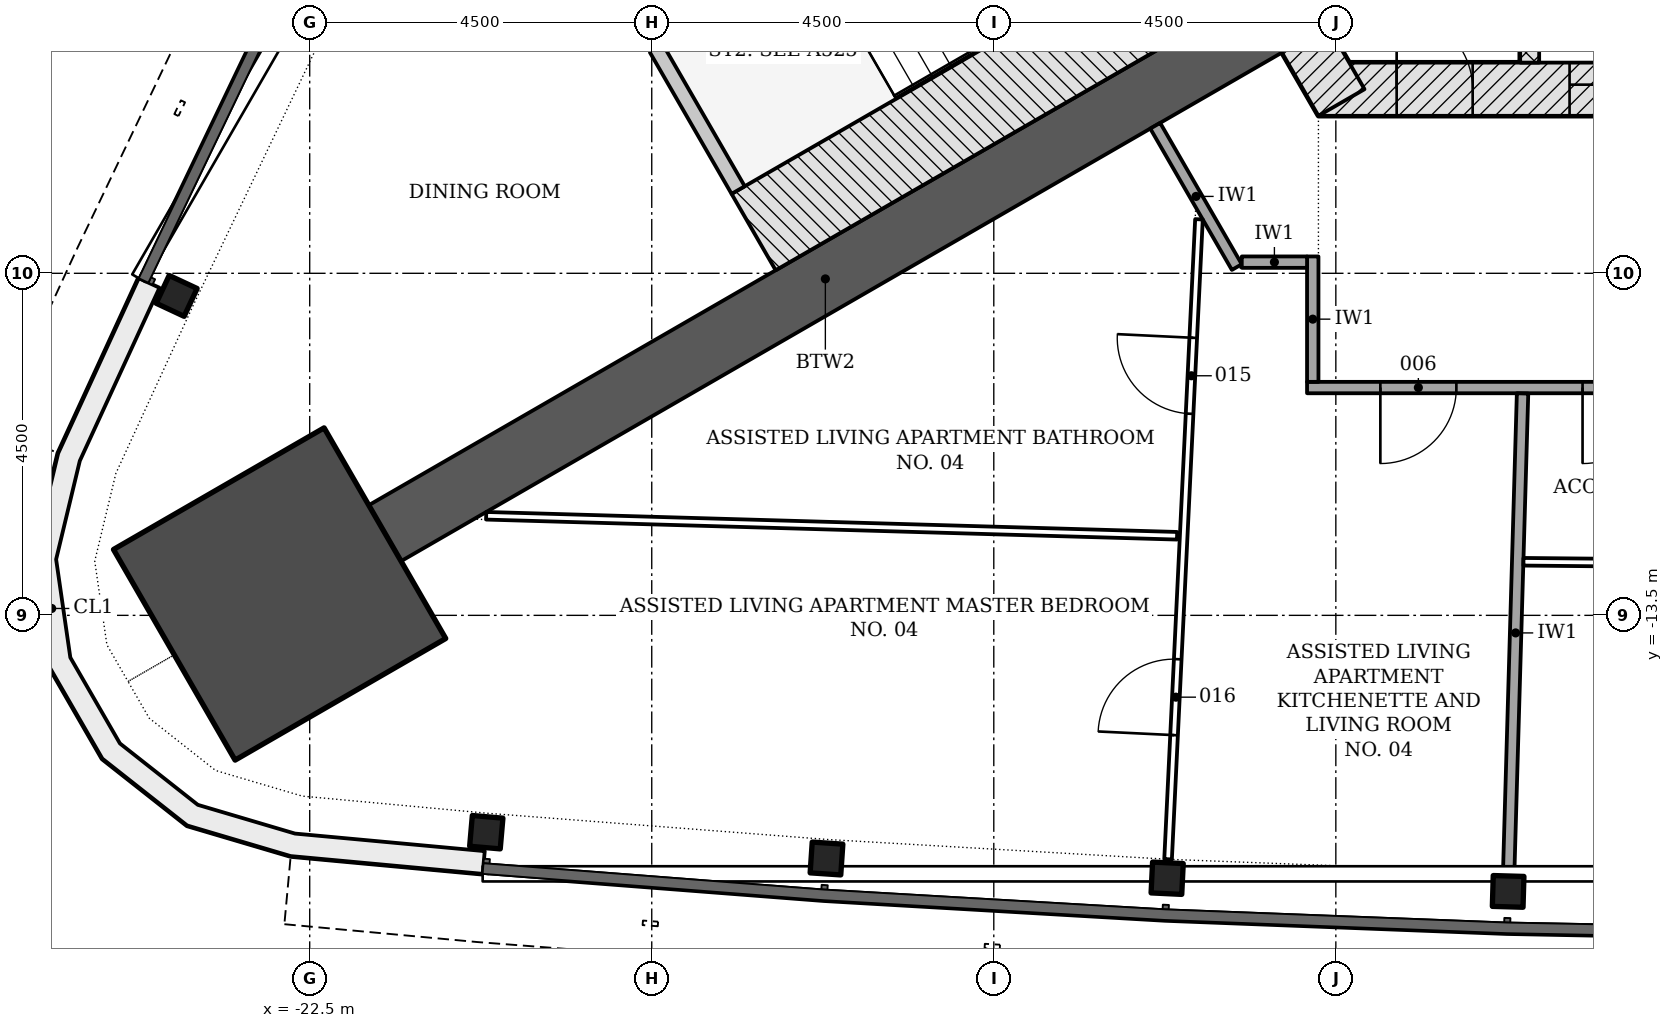
"""IFC4 building model, lengths in metres.
Left out: names, types, materials, properties, quantities, classifications, styles, units other than length and angle.
Written with IfcOpenShell. Run it as: python <this file> out.ifc"""

import sys

from ifc_helpers import new_model, si_unit, direction, frame, frame_2d, origin, origin_2d, place, context, subcontext, project, spatial, polyline, rectangle, i_section, outline, extrude, element, fill, save


model = new_model("IFC4")
c1 = context("Model", 3, precision=1e-05, world=origin(), true_north=direction((0.0, 1.0)))
c2 = subcontext(c1, "Body", "Model", "MODEL_VIEW")
j1 = project(units=[si_unit("LENGTHUNIT", "METRE"), si_unit("PLANEANGLEUNIT", "RADIAN")], contexts=[c1])
p1 = place(None, origin())
s1 = spatial("IfcSite", under=j1, at=p1, CompositionType="ELEMENT")
p2 = place(p1, origin())
s2 = spatial("IfcBuilding", under=s1, at=p2, CompositionType="ELEMENT")
p3 = place(p2, frame((0.0, 0.0, 72.6)))
s3 = spatial("IfcBuildingStorey", under=s2, at=p3, CompositionType="ELEMENT", Elevation=72.6)
p4 = place(p3, frame((-9.229, -6.578, -0.2), z_axis=(0.0, 0.0, 1.0), x_axis=(1.0, 0.0, 0.0)))
e1 = element("IfcWall", 1, at=p4, inside=s3, PredefinedType="SHEAR", context=c2, shape_type="SweptSolid", body=[
    extrude(rectangle(XDim=18.458, YDim=0.7, at=frame_2d((9.229, 0.0))), origin(), (0.0, 0.0, 1.0), 3.6),
])
p5 = place(p4, frame((3.304, 0.0, 0.2)))
e2 = element("IfcOpeningElement", 2, at=p5, cuts=e1, PredefinedType="OPENING", context=c2, shape_type="SweptSolid", body=[
    extrude(rectangle(XDim=1.1, YDim=2.1, at=frame_2d((0.55, 1.05))), frame((0.0, 0.36, 0.0), z_axis=(0.0, -1.0, 0.0), x_axis=(1.0, 0.0, 0.0)), (0.0, 0.0, 1.0), 0.72),
])
p6 = place(p4, frame((5.454, 0.0, 0.2)))
e3 = element("IfcOpeningElement", 3, at=p6, cuts=e1, PredefinedType="OPENING", context=c2, shape_type="SweptSolid", body=[
    extrude(rectangle(XDim=1.1, YDim=2.1, at=frame_2d((0.55, 1.05))), frame((0.0, 0.36, 0.0), z_axis=(0.0, -1.0, 0.0), x_axis=(1.0, 0.0, 0.0)), (0.0, 0.0, 1.0), 0.72),
])
p7 = place(p4, frame((7.604, 0.0, 0.2)))
e4 = element("IfcOpeningElement", 4, at=p7, cuts=e1, PredefinedType="OPENING", context=c2, shape_type="SweptSolid", body=[
    extrude(rectangle(XDim=1.1, YDim=2.1, at=frame_2d((0.55, 1.05))), frame((0.0, 0.36, 0.0), z_axis=(0.0, -1.0, 0.0), x_axis=(1.0, 0.0, 0.0)), (0.0, 0.0, 1.0), 0.72),
])
p8 = place(p4, frame((9.754, 0.0, 0.2)))
e5 = element("IfcOpeningElement", 5, at=p8, cuts=e1, PredefinedType="OPENING", context=c2, shape_type="SweptSolid", body=[
    extrude(rectangle(XDim=1.1, YDim=2.1, at=frame_2d((0.55, 1.05))), frame((0.0, 0.36, 0.0), z_axis=(0.0, -1.0, 0.0), x_axis=(1.0, 0.0, 0.0)), (0.0, 0.0, 1.0), 0.72),
])
p9 = place(p4, frame((11.904, 0.0, 0.2)))
e6 = element("IfcOpeningElement", 6, at=p9, cuts=e1, PredefinedType="OPENING", context=c2, shape_type="SweptSolid", body=[
    extrude(rectangle(XDim=1.1, YDim=2.1, at=frame_2d((0.55, 1.05))), frame((0.0, 0.36, 0.0), z_axis=(0.0, -1.0, 0.0), x_axis=(1.0, 0.0, 0.0)), (0.0, 0.0, 1.0), 0.72),
])
p10 = place(p4, frame((14.054, 0.0, 0.2)))
e7 = element("IfcOpeningElement", 7, at=p10, cuts=e1, PredefinedType="OPENING", context=c2, shape_type="SweptSolid", body=[
    extrude(rectangle(XDim=1.1, YDim=2.1, at=frame_2d((0.55, 1.05))), frame((0.0, 0.36, 0.0), z_axis=(0.0, -1.0, 0.0), x_axis=(1.0, 0.0, 0.0)), (0.0, 0.0, 1.0), 0.72),
])
p11 = place(p4, frame((1.029, 0.0, 0.2)))
e8 = element("IfcOpeningElement", 8, at=p11, cuts=e1, PredefinedType="OPENING", context=c2, shape_type="SweptSolid", body=[
    extrude(rectangle(XDim=1.0, YDim=2.1, at=frame_2d((0.5, 1.05))), frame((0.0, 0.36, 0.0), z_axis=(0.0, -1.0, 0.0), x_axis=(1.0, 0.0, 0.0)), (0.0, 0.0, 1.0), 0.72),
])
p12 = place(p3, frame((-10.311, -4.353, -0.2), z_axis=(0.0, 0.0, 1.0), x_axis=(0.500042739161, -0.866000726912, 0.0)))
e9 = element("IfcWall", 9, at=p12, inside=s3, PredefinedType="SHEAR", context=c2, shape_type="SweptSolid", body=[
    extrude(rectangle(XDim=2.771, YDim=0.7, at=frame_2d((1.386, 0.0))), origin(), (0.0, 0.0, 1.0), 3.6),
])
p13 = place(p3, frame((-9.922, -5.728, -0.2), z_axis=(0.0, 0.0, 1.0), x_axis=(-0.866026077102, -0.499998833779, 0.0)))
e10 = element("IfcWall", 10, at=p13, inside=s3, PredefinedType="SHEAR", context=c2, shape_type="SweptSolid", body=[
    extrude(rectangle(XDim=13.381, YDim=0.85, at=frame_2d((6.691, 0.0))), origin(), (0.0, 0.0, 1.0), 3.6),
])
p14 = place(p3, frame((-22.896, -13.219, -0.2), z_axis=(0.0, 0.0, 1.0), x_axis=(-0.866025403784, -0.5, 0.0)))
e11 = element("IfcColumn", 11, at=p14, inside=s3, PredefinedType="COLUMN", context=c2, shape_type="SweptSolid", body=[
    extrude(rectangle(XDim=3.2, YDim=3.2, at=origin_2d()), origin(), (0.0, 0.0, 1.0), 3.6),
])
for number, where, z_axis, x_axis in (
    (12, (-24.25, -9.297, -0.2), (0.0, 0.0, 1.0), (-0.423, -0.906, 0.0)),
    (13, (-20.177, -16.353, -0.2), (0.0, 0.0, 1.0), (0.996, -0.087, 0.0)),
    (14, (-15.701, -16.699, -0.2), (0.0, 0.0, 1.0), (0.998, -0.067, 0.0)),
    (15, (-11.219, -16.958, -0.2), (0.0, 0.0, 1.0), (0.999, -0.048, 0.0)),
    (16, (-6.733, -17.132, -0.2), (0.0, 0.0, 1.0), (1.0, -0.029, 0.0)),
):
    element("IfcColumn", number, at=place(p3, frame(where, z_axis=z_axis, x_axis=x_axis)), inside=s3, PredefinedType="COLUMN", context=c2, shape_type="SweptSolid", body=[
        extrude(i_section(OverallWidth=0.404, OverallDepth=0.406, WebThickness=0.027, FlangeThickness=0.044, FilletRadius=0.015, at=origin_2d()), origin(), (0.0, 0.0, 1.0), 3.6),
    ])
p15 = place(p3, origin())
e17 = element("IfcWall", 17, at=p15, inside=s3, PredefinedType="NOTDEFINED", context=c2, shape_type="SweptSolid", body=[
    extrude(outline(polyline([(-24.749, -9.065), (-25.809, -11.369), (-26.141, -12.75), (-25.938, -14.155), (-25.228, -15.385), (-24.112, -16.264), (-22.75, -16.667), (-20.225, -16.901), (-20.197, -16.602), (-22.693, -16.371), (-23.972, -15.993), (-24.997, -15.185), (-25.649, -14.055), (-25.836, -12.764), (-25.524, -11.468), (-24.476, -9.19), (-24.749, -9.065)])), origin(), (0.0, 0.0, 1.0), 3.3),
])
p16 = place(p3, frame((-6.45, -6.228, -0.2), z_axis=(0.0, 0.0, 1.0), x_axis=(0.0, 1.0, 0.0)))
e18 = element("IfcWall", 18, at=p16, inside=s3, PredefinedType="PARTITIONING", context=c2, shape_type="SweptSolid", body=[
    extrude(rectangle(XDim=2.5, YDim=0.25, at=frame_2d((1.25, 0.0))), origin(), (0.0, 0.0, 1.0), 3.6),
])
p17 = place(p3, frame((-10.424, -4.858, -0.2), z_axis=(0.0, 0.0, 1.0), x_axis=(-0.866033125095, -0.499986626058, 0.0)))
e19 = element("IfcWall", 19, at=p17, inside=s3, PredefinedType="SHEAR", context=c2, shape_type="SweptSolid", body=[
    extrude(rectangle(XDim=7.2, YDim=1.161, at=frame_2d((3.6, 0.0))), origin(), (0.0, 0.0, 1.0), 3.6),
])
p18 = place(p3, frame((0.0, 0.0, -0.2)))
e20 = element("IfcWall", 20, at=p18, inside=s3, PredefinedType="SHEAR", context=c2, shape_type="SweptSolid", body=[
    extrude(outline(polyline([(-17.439, -3.907), (-18.025, -6.093), (-16.95, -7.955), (-16.777, -7.855), (-17.81, -6.065), (-17.267, -4.039), (-17.339, -4.081), (-17.339, -4.081), (-17.339, -4.081), (-17.339, -4.081), (-17.339, -4.081), (-17.339, -4.081), (-17.339, -4.081), (-17.339, -4.081), (-17.339, -4.081), (-17.339, -4.081), (-17.339, -4.081), (-17.339, -4.081), (-17.339, -4.081), (-17.339, -4.081), (-17.339, -4.081), (-17.339, -4.081), (-17.339, -4.081), (-17.439, -3.907)])), origin(), (0.0, 0.0, 1.0), 3.6),
])
p19 = place(p3, frame((3.689, -10.503, 0.0), z_axis=(0.0, 0.0, 1.0), x_axis=(-1.0, 0.0, 0.0)))
e21 = element("IfcWall", 21, at=p19, inside=s3, PredefinedType="PARTITIONING", context=c2, shape_type="SweptSolid", body=[
    extrude(rectangle(XDim=13.068, YDim=0.15, at=frame_2d((6.534, 0.0))), origin(), (0.0, 0.0, 1.0), 2.778),
])
p20 = place(p19, frame((11.103, 0.0, 0.0)))
e22 = element("IfcOpeningElement", 22, at=p20, cuts=e21, PredefinedType="OPENING", context=c2, shape_type="SweptSolid", body=[
    extrude(rectangle(XDim=1.0, YDim=2.1, at=frame_2d((0.5, 1.05))), frame((0.0, 0.085, 0.0), z_axis=(0.0, -1.0, 0.0), x_axis=(1.0, 0.0, 0.0)), (0.0, 0.0, 1.0), 0.17),
])
p21 = place(p19, frame((8.443, 0.0, 0.0)))
e23 = element("IfcOpeningElement", 23, at=p21, cuts=e21, PredefinedType="OPENING", context=c2, shape_type="SweptSolid", body=[
    extrude(rectangle(XDim=1.0, YDim=2.1, at=frame_2d((0.5, 1.05))), frame((0.0, 0.085, 0.0), z_axis=(0.0, -1.0, 0.0), x_axis=(1.0, 0.0, 0.0)), (0.0, 0.0, 1.0), 0.17),
])
p22 = place(p19, frame((5.879, 0.0, 0.0)))
e24 = element("IfcOpeningElement", 24, at=p22, cuts=e21, PredefinedType="OPENING", context=c2, shape_type="SweptSolid", body=[
    extrude(rectangle(XDim=1.0, YDim=2.1, at=frame_2d((0.5, 1.05))), frame((0.0, 0.085, 0.0), z_axis=(0.0, -1.0, 0.0), x_axis=(1.0, 0.0, 0.0)), (0.0, 0.0, 1.0), 0.17),
])
p23 = place(p19, frame((2.556, 0.0, 0.0)))
e25 = element("IfcOpeningElement", 25, at=p23, cuts=e21, PredefinedType="OPENING", context=c2, shape_type="SweptSolid", body=[
    extrude(rectangle(XDim=1.5, YDim=2.1, at=frame_2d((0.75, 1.05))), frame((0.0, 0.085, 0.0), z_axis=(0.0, -1.0, 0.0), x_axis=(1.0, 0.0, 0.0)), (0.0, 0.0, 1.0), 0.17),
])
p24 = place(p3, frame((-11.376, -7.059, 0.0), z_axis=(0.0, 0.0, 1.0), x_axis=(0.500076779081, -0.865981070823, 0.0)))
e26 = element("IfcWall", 26, at=p24, inside=s3, PredefinedType="PARTITIONING", context=c2, shape_type="SweptSolid", body=[
    extrude(rectangle(XDim=2.147, YDim=0.15, at=frame_2d((1.074, 0.0))), origin(), (0.0, 0.0, 1.0), 2.778),
])
p25 = place(p3, frame((-9.304, -10.428, 0.0), z_axis=(0.0, 0.0, 1.0), x_axis=(0.0, 1.0, 0.0)))
e27 = element("IfcWall", 27, at=p25, inside=s3, PredefinedType="PARTITIONING", context=c2, shape_type="SweptSolid", body=[
    extrude(rectangle(XDim=1.65, YDim=0.15, at=frame_2d((0.825, 0.0))), origin(), (0.0, 0.0, 1.0), 3.4),
])
p26 = place(p3, frame((-10.238, -8.853, 0.0), z_axis=(0.0, 0.0, 1.0), x_axis=(1.0, 0.0, 0.0)))
e28 = element("IfcWall", 28, at=p26, inside=s3, PredefinedType="PARTITIONING", context=c2, shape_type="SweptSolid", body=[
    extrude(rectangle(XDim=0.859, YDim=0.15, at=frame_2d((0.43, 0.0))), origin(), (0.0, 0.0, 1.0), 3.4),
])
p27 = place(p3, frame((-6.726, -16.882, 0.0), z_axis=(0.0, 0.0, 1.0), x_axis=(0.028929036321, 0.999581467844, 0.0)))
e29 = element("IfcWall", 29, at=p27, inside=s3, PredefinedType="PARTITIONING", context=c2, shape_type="SweptSolid", body=[
    extrude(rectangle(XDim=6.304, YDim=0.15, at=frame_2d((3.152, 0.0))), origin(), (0.0, 0.0, 1.0), 2.778),
])
p28 = place(p3, frame((-11.089, -12.453, 0.0), z_axis=(0.0, 0.0, 1.0), x_axis=(-0.999581884532, 0.028914634982, 0.0)))
e30 = element("IfcWall", 30, at=p28, inside=s3, PredefinedType="PARTITIONING", context=c2, shape_type="SweptSolid", body=[
    extrude(rectangle(XDim=9.094, YDim=0.1, at=frame_2d((4.547, 0.0))), origin(), (0.0, 0.0, 1.0), 2.778),
])
p29 = place(p3, frame((-11.207, -16.709, 0.0), z_axis=(0.0, 0.0, 1.0), x_axis=(0.048196786961, 0.998837859578, 0.0)))
e31 = element("IfcWall", 31, at=p29, inside=s3, PredefinedType="PARTITIONING", context=c2, shape_type="SweptSolid", body=[
    extrude(rectangle(XDim=8.429, YDim=0.1, at=frame_2d((4.214, 0.0))), origin(), (0.0, 0.0, 1.0), 2.778),
])
p30 = place(p29, frame((5.868, 0.0, 0.0)))
e32 = element("IfcOpeningElement", 32, at=p30, cuts=e31, PredefinedType="OPENING", context=c2, shape_type="SweptSolid", body=[
    extrude(rectangle(XDim=1.0, YDim=2.1, at=frame_2d((0.5, 1.05))), frame((0.0, 0.06, 0.0), z_axis=(0.0, -1.0, 0.0), x_axis=(1.0, 0.0, 0.0)), (0.0, 0.0, 1.0), 0.12),
])
p31 = place(p29, frame((1.635, 0.0, 0.0)))
e33 = element("IfcOpeningElement", 33, at=p31, cuts=e31, PredefinedType="OPENING", context=c2, shape_type="SweptSolid", body=[
    extrude(rectangle(XDim=1.0, YDim=2.1, at=frame_2d((0.5, 1.05))), frame((0.0, 0.06, 0.0), z_axis=(0.0, -1.0, 0.0), x_axis=(1.0, 0.0, 0.0)), (0.0, 0.0, 1.0), 0.12),
])
p32 = place(p3, frame((-6.531, -12.795, 0.0), z_axis=(0.0, 0.0, 1.0), x_axis=(0.99995315176, -0.009679580841, 0.0)))
e34 = element("IfcWall", 34, at=p32, inside=s3, PredefinedType="PARTITIONING", context=c2, shape_type="SweptSolid", body=[
    extrude(rectangle(XDim=5.12, YDim=0.1, at=frame_2d((2.56, 0.0))), origin(), (0.0, 0.0, 1.0), 2.778),
])
p33 = place(p5, origin())
e35 = element("IfcDoor", 35, at=p33, inside=s3, OperationType="DOUBLE_DOOR_SLIDING", PredefinedType="DOOR", context=c2, shape_type="SweptSolid", body=[
    extrude(rectangle(XDim=1.1, YDim=2.1, at=frame_2d((0.55, 1.05))), frame((0.0, 0.025, 0.0), z_axis=(0.0, -1.0, 0.0), x_axis=(1.0, 0.0, 0.0)), (0.0, 0.0, 1.0), 0.05),
])
fill(e2, e35)
p34 = place(p11, origin())
e36 = element("IfcDoor", 36, at=p34, inside=s3, OperationType="SINGLE_SWING_LEFT", PredefinedType="DOOR", context=c2, shape_type="SweptSolid", body=[
    extrude(rectangle(XDim=1.0, YDim=2.1, at=frame_2d((0.5, 1.05))), frame((0.0, 0.075, 0.0), z_axis=(0.0, -1.0, 0.0), x_axis=(1.0, 0.0, 0.0)), (0.0, 0.0, 1.0), 0.15),
])
fill(e8, e36)
p35 = place(p20, origin())
e37 = element("IfcDoor", 37, at=p35, inside=s3, OperationType="SINGLE_SWING_RIGHT", PredefinedType="DOOR", context=c2, shape_type="SweptSolid", body=[
    extrude(rectangle(XDim=1.0, YDim=2.1, at=frame_2d((0.5, 1.05))), frame((0.0, 0.025, 0.0), z_axis=(0.0, -1.0, 0.0), x_axis=(1.0, 0.0, 0.0)), (0.0, 0.0, 1.0), 0.05),
])
fill(e22, e37)
p36 = place(p21, origin())
e38 = element("IfcDoor", 38, at=p36, inside=s3, OperationType="SINGLE_SWING_RIGHT", PredefinedType="DOOR", context=c2, shape_type="SweptSolid", body=[
    extrude(rectangle(XDim=1.0, YDim=2.1, at=frame_2d((0.5, 1.05))), frame((0.0, 0.025, 0.0), z_axis=(0.0, -1.0, 0.0), x_axis=(1.0, 0.0, 0.0)), (0.0, 0.0, 1.0), 0.05),
])
fill(e23, e38)
p37 = place(p30, origin())
e39 = element("IfcDoor", 39, at=p37, inside=s3, OperationType="SINGLE_SWING_RIGHT", PredefinedType="DOOR", context=c2, shape_type="SweptSolid", body=[
    extrude(rectangle(XDim=1.0, YDim=2.1, at=frame_2d((0.5, 1.05))), frame((0.0, 0.025, 0.0), z_axis=(0.0, -1.0, 0.0), x_axis=(1.0, 0.0, 0.0)), (0.0, 0.0, 1.0), 0.05),
])
fill(e32, e39)
p38 = place(p31, origin())
e40 = element("IfcDoor", 40, at=p38, inside=s3, OperationType="SINGLE_SWING_LEFT", PredefinedType="DOOR", context=c2, shape_type="SweptSolid", body=[
    extrude(rectangle(XDim=1.0, YDim=2.1, at=frame_2d((0.5, 1.05))), frame((0.0, 0.025, 0.0), z_axis=(0.0, -1.0, 0.0), x_axis=(1.0, 0.0, 0.0)), (0.0, 0.0, 1.0), 0.05),
])
fill(e33, e40)
save(model, sys.argv[1])
